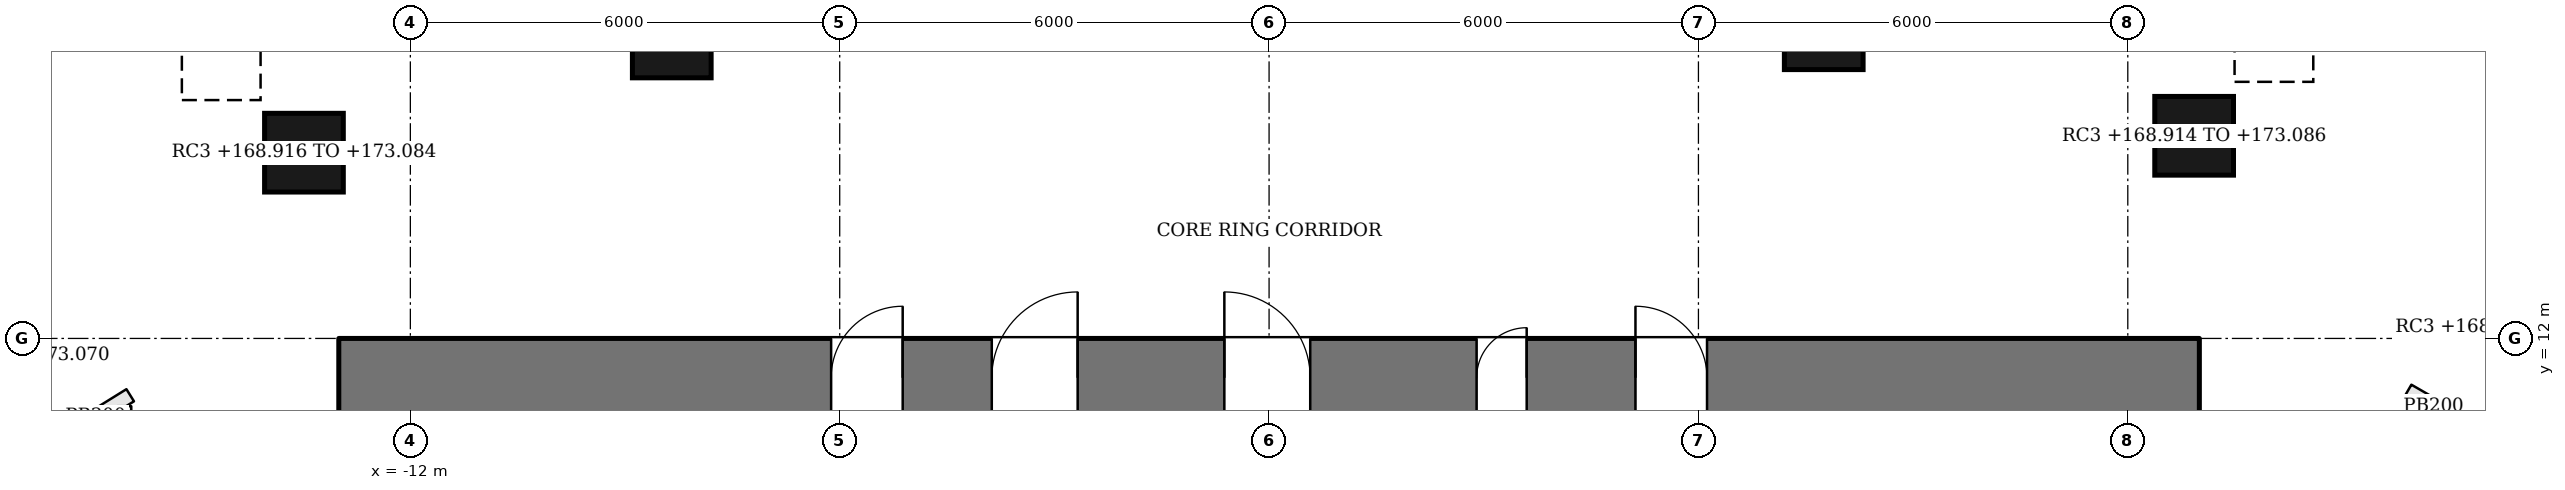
"""IFC4 building model, lengths in metres.
Left out: names, types, materials, properties, quantities, classifications, styles, units other than length and angle.
Written with IfcOpenShell. Run it as: python <this file> out.ifc"""

import sys

from ifc_helpers import new_model, si_unit, direction, frame, frame_2d, origin, origin_2d, place, context, subcontext, project, spatial, rectangle, extrude, element, fill, save


model = new_model("IFC4")
c1 = context("Model", 3, precision=1e-05, world=origin(), true_north=direction((0.0, 1.0)))
c2 = subcontext(c1, "Body", "Model", "MODEL_VIEW")
j1 = project(units=[si_unit("LENGTHUNIT", "METRE"), si_unit("PLANEANGLEUNIT", "RADIAN")], contexts=[c1])
p1 = place(None, origin())
s1 = spatial("IfcSite", under=j1, at=p1, CompositionType="ELEMENT")
p2 = place(p1, origin())
s2 = spatial("IfcBuilding", under=s1, at=p2, CompositionType="ELEMENT")
p3 = place(p2, frame((0.0, 0.0, 169.5)))
s3 = spatial("IfcBuildingStorey", under=s2, at=p3, CompositionType="ELEMENT", Elevation=169.5)
p4 = place(p3, frame((-13.0, 11.45, 0.0), z_axis=(0.0, 0.0, 1.0), x_axis=(1.0, 0.0, 0.0)))
e1 = element("IfcWall", 1, at=p4, inside=s3, PredefinedType="SHEAR", context=c2, shape_type="SweptSolid", body=[
    extrude(rectangle(XDim=26.0, YDim=1.1, at=frame_2d((13.0, 0.0))), origin(), (0.0, 0.0, 1.0), 4.5),
])
p5 = place(p4, frame((9.125, 0.0, 0.0)))
e2 = element("IfcOpeningElement", 2, at=p5, cuts=e1, PredefinedType="OPENING", context=c2, shape_type="SweptSolid", body=[
    extrude(rectangle(XDim=1.2, YDim=2.1, at=frame_2d((0.6, 1.05))), frame((0.0, 0.56, 0.0), z_axis=(0.0, -1.0, 0.0), x_axis=(1.0, 0.0, 0.0)), (0.0, 0.0, 1.0), 1.12),
])
p6 = place(p4, frame((12.375, 0.0, 0.0)))
e3 = element("IfcOpeningElement", 3, at=p6, cuts=e1, PredefinedType="OPENING", context=c2, shape_type="SweptSolid", body=[
    extrude(rectangle(XDim=1.2, YDim=2.1, at=frame_2d((0.6, 1.05))), frame((0.0, 0.56, 0.0), z_axis=(0.0, -1.0, 0.0), x_axis=(1.0, 0.0, 0.0)), (0.0, 0.0, 1.0), 1.12),
])
p7 = place(p4, frame((15.9, 0.0, 0.0)))
e4 = element("IfcOpeningElement", 4, at=p7, cuts=e1, PredefinedType="OPENING", context=c2, shape_type="SweptSolid", body=[
    extrude(rectangle(XDim=0.7, YDim=2.1, at=frame_2d((0.35, 1.05))), frame((0.0, 0.56, 0.0), z_axis=(0.0, -1.0, 0.0), x_axis=(1.0, 0.0, 0.0)), (0.0, 0.0, 1.0), 1.12),
])
p8 = place(p4, frame((6.88, 0.0, 0.0)))
e5 = element("IfcOpeningElement", 5, at=p8, cuts=e1, PredefinedType="OPENING", context=c2, shape_type="SweptSolid", body=[
    extrude(rectangle(XDim=1.0, YDim=2.1, at=frame_2d((0.5, 1.05))), frame((0.0, 0.56, 0.0), z_axis=(0.0, -1.0, 0.0), x_axis=(1.0, 0.0, 0.0)), (0.0, 0.0, 1.0), 1.12),
])
p9 = place(p4, frame((18.12, 0.0, 0.0)))
e6 = element("IfcOpeningElement", 6, at=p9, cuts=e1, PredefinedType="OPENING", context=c2, shape_type="SweptSolid", body=[
    extrude(rectangle(XDim=1.0, YDim=2.1, at=frame_2d((0.5, 1.05))), frame((0.0, 0.56, 0.0), z_axis=(0.0, -1.0, 0.0), x_axis=(1.0, 0.0, 0.0)), (0.0, 0.0, 1.0), 1.12),
])
p10 = place(p3, frame((17.584, 12.151, -0.572), z_axis=(0.332531725465, 0.233315929766, 0.91377586337), x_axis=(-0.574360318683, 0.818602604639, 0.0)))
e7 = element("IfcColumn", 7, at=p10, inside=s3, PredefinedType="COLUMN", context=c2, shape_type="SweptSolid", body=[
    extrude(rectangle(XDim=1.1, YDim=1.1, at=origin_2d()), origin(), (0.0, 0.0, 1.0), 4.535),
])
p11 = place(p3, frame((12.927, 14.832, -0.586), z_axis=(0.247177957591, 0.289068857345, 0.924847151152), x_axis=(-0.760029513811, 0.649888558243, 0.0)))
e8 = element("IfcColumn", 8, at=p11, inside=s3, PredefinedType="COLUMN", context=c2, shape_type="SweptSolid", body=[
    extrude(rectangle(XDim=1.1, YDim=1.1, at=origin_2d()), origin(), (0.0, 0.0, 1.0), 4.511),
])
p12 = place(p3, frame((7.751, 16.307, -0.6), z_axis=(0.149431469431, 0.321095558359, 0.935183339429), x_axis=(-0.906629641713, 0.421927354845, 0.0)))
e9 = element("IfcColumn", 9, at=p12, inside=s3, PredefinedType="COLUMN", context=c2, shape_type="SweptSolid", body=[
    extrude(rectangle(XDim=1.1, YDim=1.1, at=origin_2d()), origin(), (0.0, 0.0, 1.0), 4.491),
])
p13 = place(p3, frame((-8.347, 16.192, -0.599), z_axis=(-0.159354687822, 0.318926702187, 0.934286809337), x_axis=(-0.89454907246, -0.446969749493, 0.0)))
e10 = element("IfcColumn", 10, at=p13, inside=s3, PredefinedType="COLUMN", context=c2, shape_type="SweptSolid", body=[
    extrude(rectangle(XDim=1.1, YDim=1.1, at=origin_2d()), origin(), (0.0, 0.0, 1.0), 4.493),
])
p14 = place(p3, frame((-13.487, 14.596, -0.584), z_axis=(-0.256195674107, 0.284818168637, 0.923711203452), x_axis=(-0.743476713513, -0.66876182342, 0.0)))
e11 = element("IfcColumn", 11, at=p14, inside=s3, PredefinedType="COLUMN", context=c2, shape_type="SweptSolid", body=[
    extrude(rectangle(XDim=1.1, YDim=1.1, at=origin_2d()), origin(), (0.0, 0.0, 1.0), 4.512),
])
p15 = place(p3, frame((-16.883, 10.605, 0.0), z_axis=(0.0, 0.0, 1.0), x_axis=(0.84954745962, 0.527512193085, 0.0)))
e12 = element("IfcWall", 12, at=p15, inside=s3, PredefinedType="PARTITIONING", context=c2, shape_type="SweptSolid", body=[
    extrude(rectangle(XDim=1.139, YDim=0.2, at=frame_2d((0.57, 0.0))), origin(), (0.0, 0.0, 1.0), 4.3),
])
p16 = place(p3, frame((-16.0, 11.053, 0.0), z_axis=(0.0, 0.0, 1.0), x_axis=(0.0, -1.0, 0.0)))
e13 = element("IfcWall", 13, at=p16, inside=s3, PredefinedType="PARTITIONING", context=c2, shape_type="SweptSolid", body=[
    extrude(rectangle(XDim=16.953, YDim=0.2, at=frame_2d((8.477, 0.0))), origin(), (0.0, 0.0, 1.0), 4.3),
])
p17 = place(p16, frame((6.077, 0.0, 0.0)))
e14 = element("IfcOpeningElement", 14, at=p17, cuts=e13, PredefinedType="OPENING", context=c2, shape_type="SweptSolid", body=[
    extrude(rectangle(XDim=1.8, YDim=2.1, at=frame_2d((0.9, 1.05))), frame((0.0, 0.11, 0.0), z_axis=(0.0, -1.0, 0.0), x_axis=(1.0, 0.0, 0.0)), (0.0, 0.0, 1.0), 0.22),
])
p18 = place(p3, frame((15.913, 11.267, 0.0), z_axis=(0.0, 0.0, 1.0), x_axis=(0.866219676164, -0.4996633593, 0.0)))
e15 = element("IfcWall", 15, at=p18, inside=s3, PredefinedType="PARTITIONING", context=c2, shape_type="SweptSolid", body=[
    extrude(rectangle(XDim=0.834, YDim=0.2, at=frame_2d((0.417, 0.0))), origin(), (0.0, 0.0, 1.0), 4.3),
])
p19 = place(p3, frame((16.0, -5.9, 0.0), z_axis=(0.0, 0.0, 1.0), x_axis=(0.0, 1.0, 0.0)))
e16 = element("IfcWall", 16, at=p19, inside=s3, PredefinedType="PARTITIONING", context=c2, shape_type="SweptSolid", body=[
    extrude(rectangle(XDim=17.017, YDim=0.2, at=frame_2d((8.508, 0.0))), origin(), (0.0, 0.0, 1.0), 4.3),
])
p20 = place(p19, frame((9.108, 0.0, 0.0)))
e17 = element("IfcOpeningElement", 17, at=p20, cuts=e16, PredefinedType="OPENING", context=c2, shape_type="SweptSolid", body=[
    extrude(rectangle(XDim=1.8, YDim=2.1, at=frame_2d((0.9, 1.05))), frame((0.0, 0.11, 0.0), z_axis=(0.0, -1.0, 0.0), x_axis=(1.0, 0.0, 0.0)), (0.0, 0.0, 1.0), 0.22),
])
p21 = place(p5, origin())
e18 = element("IfcDoor", 18, at=p21, inside=s3, OperationType="SINGLE_SWING_RIGHT", PredefinedType="DOOR", context=c2, shape_type="SweptSolid", body=[
    extrude(rectangle(XDim=1.2, YDim=2.1, at=frame_2d((0.6, 1.05))), frame((0.0, 0.025, 0.0), z_axis=(0.0, -1.0, 0.0), x_axis=(1.0, 0.0, 0.0)), (0.0, 0.0, 1.0), 0.05),
])
fill(e2, e18)
p22 = place(p6, origin())
e19 = element("IfcDoor", 19, at=p22, inside=s3, OperationType="SINGLE_SWING_LEFT", PredefinedType="DOOR", context=c2, shape_type="SweptSolid", body=[
    extrude(rectangle(XDim=1.2, YDim=2.1, at=frame_2d((0.6, 1.05))), frame((0.0, 0.025, 0.0), z_axis=(0.0, -1.0, 0.0), x_axis=(1.0, 0.0, 0.0)), (0.0, 0.0, 1.0), 0.05),
])
fill(e3, e19)
p23 = place(p7, origin())
e20 = element("IfcDoor", 20, at=p23, inside=s3, OperationType="SINGLE_SWING_RIGHT", PredefinedType="DOOR", context=c2, shape_type="SweptSolid", body=[
    extrude(rectangle(XDim=0.7, YDim=2.1, at=frame_2d((0.35, 1.05))), frame((0.0, 0.025, 0.0), z_axis=(0.0, -1.0, 0.0), x_axis=(1.0, 0.0, 0.0)), (0.0, 0.0, 1.0), 0.05),
])
fill(e4, e20)
p24 = place(p8, origin())
e21 = element("IfcDoor", 21, at=p24, inside=s3, OperationType="SINGLE_SWING_RIGHT", PredefinedType="DOOR", context=c2, shape_type="SweptSolid", body=[
    extrude(rectangle(XDim=1.0, YDim=2.1, at=frame_2d((0.5, 1.05))), frame((0.0, 0.025, 0.0), z_axis=(0.0, -1.0, 0.0), x_axis=(1.0, 0.0, 0.0)), (0.0, 0.0, 1.0), 0.05),
])
fill(e5, e21)
p25 = place(p9, origin())
e22 = element("IfcDoor", 22, at=p25, inside=s3, OperationType="SINGLE_SWING_LEFT", PredefinedType="DOOR", context=c2, shape_type="SweptSolid", body=[
    extrude(rectangle(XDim=1.0, YDim=2.1, at=frame_2d((0.5, 1.05))), frame((0.0, 0.025, 0.0), z_axis=(0.0, -1.0, 0.0), x_axis=(1.0, 0.0, 0.0)), (0.0, 0.0, 1.0), 0.05),
])
fill(e6, e22)
save(model, sys.argv[1])
